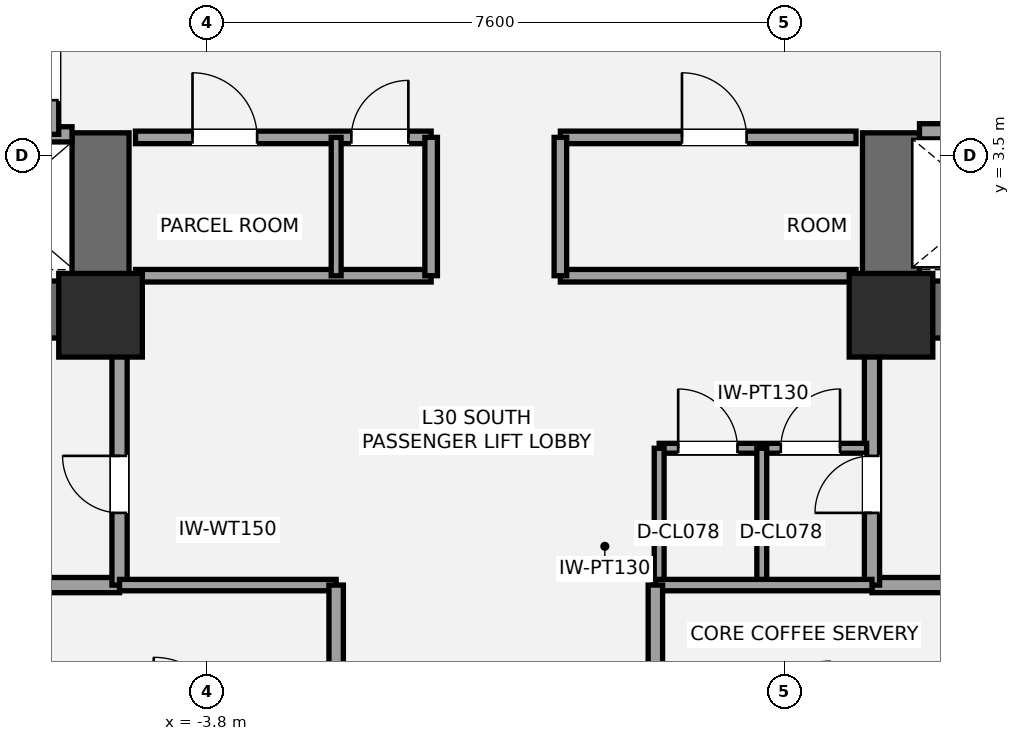
"""IFC4 building model, lengths in metres.
Left out: names, types, materials, properties, quantities, classifications, styles, units other than length and angle.
Written with IfcOpenShell. Run it as: python <this file> out.ifc"""

import sys

from ifc_helpers import new_model, si_unit, direction, frame, frame_2d, origin, origin_2d, place, context, subcontext, project, spatial, rectangle, extrude, element, fill, save


model = new_model("IFC4")
c1 = context("Model", 3, precision=1e-05, world=origin(), true_north=direction((0.0, 1.0)))
c2 = subcontext(c1, "Body", "Model", "MODEL_VIEW")
j1 = project(units=[si_unit("LENGTHUNIT", "METRE"), si_unit("PLANEANGLEUNIT", "RADIAN")], contexts=[c1])
p1 = place(None, origin())
s1 = spatial("IfcSite", under=j1, at=p1, CompositionType="ELEMENT")
p2 = place(p1, origin())
s2 = spatial("IfcBuilding", under=s1, at=p2, CompositionType="ELEMENT")
p3 = place(p2, frame((0.0, 0.0, 114.1)))
s3 = spatial("IfcBuildingStorey", under=s2, at=p3, CompositionType="ELEMENT", Elevation=114.1)
p4 = place(p3, frame((-4.825, 1.475, 0.0), z_axis=(0.0, 0.0, 1.0), x_axis=(-1.0, 0.0, 0.0)))
e1 = element("IfcWall", 1, at=p4, inside=s3, PredefinedType="SHEAR", context=c2, shape_type="SweptSolid", body=[
    extrude(rectangle(XDim=9.075, YDim=0.75, at=frame_2d((4.538, 0.0))), origin(), (0.0, 0.0, 1.0), 3.5),
])
p5 = place(p4, frame((5.475, 0.0, 0.0)))
e2 = element("IfcOpeningElement", 2, at=p5, cuts=e1, PredefinedType="OPENING", context=c2, shape_type="SweptSolid", body=[
    extrude(rectangle(XDim=1.05, YDim=2.15, at=frame_2d((0.525, 1.075))), frame((0.0, 0.385, 0.0), z_axis=(0.0, -1.0, 0.0), x_axis=(1.0, 0.0, 0.0)), (0.0, 0.0, 1.0), 0.77),
])
p6 = place(p4, frame((3.805, 0.0, 0.0)))
e3 = element("IfcOpeningElement", 3, at=p6, cuts=e1, PredefinedType="OPENING", context=c2, shape_type="SweptSolid", body=[
    extrude(rectangle(XDim=1.1, YDim=2.2, at=frame_2d((0.55, 1.1))), frame((0.0, 0.385, 0.0), z_axis=(0.0, -1.0, 0.0), x_axis=(1.0, 0.0, 0.0)), (0.0, 0.0, 1.0), 0.77),
])
p7 = place(p3, frame((-5.2, 1.1, 0.0), z_axis=(0.0, 0.0, 1.0), x_axis=(0.0, 1.0, 0.0)))
e4 = element("IfcWall", 4, at=p7, inside=s3, PredefinedType="SHEAR", context=c2, shape_type="SweptSolid", body=[
    extrude(rectangle(XDim=2.7, YDim=0.75, at=frame_2d((1.35, 0.0))), origin(), (0.0, 0.0, 1.0), 3.5),
])
p8 = place(p3, frame((13.9, 1.475, 0.0), z_axis=(0.0, 0.0, 1.0), x_axis=(-1.0, 0.0, 0.0)))
e5 = element("IfcWall", 5, at=p8, inside=s3, PredefinedType="SHEAR", context=c2, shape_type="SweptSolid", body=[
    extrude(rectangle(XDim=9.075, YDim=0.75, at=frame_2d((4.538, 0.0))), origin(), (0.0, 0.0, 1.0), 3.5),
])
p9 = place(p8, frame((2.55, 0.0, 0.0)))
e6 = element("IfcOpeningElement", 6, at=p9, cuts=e5, PredefinedType="OPENING", context=c2, shape_type="SweptSolid", body=[
    extrude(rectangle(XDim=1.05, YDim=2.15, at=frame_2d((0.525, 1.075))), frame((0.0, 0.385, 0.0), z_axis=(0.0, -1.0, 0.0), x_axis=(1.0, 0.0, 0.0)), (0.0, 0.0, 1.0), 0.77),
])
p10 = place(p8, frame((4.55, 0.0, 0.0)))
e7 = element("IfcOpeningElement", 7, at=p10, cuts=e5, PredefinedType="OPENING", context=c2, shape_type="SweptSolid", body=[
    extrude(rectangle(XDim=1.1, YDim=2.2, at=frame_2d((0.55, 1.1))), frame((0.0, 0.385, 0.0), z_axis=(0.0, -1.0, 0.0), x_axis=(1.0, 0.0, 0.0)), (0.0, 0.0, 1.0), 0.77),
])
p11 = place(p3, frame((5.2, 1.1, 0.0), z_axis=(0.0, 0.0, 1.0), x_axis=(0.0, 1.0, 0.0)))
e8 = element("IfcWall", 8, at=p11, inside=s3, PredefinedType="SHEAR", context=c2, shape_type="SweptSolid", body=[
    extrude(rectangle(XDim=2.7, YDim=0.75, at=frame_2d((1.35, 0.0))), origin(), (0.0, 0.0, 1.0), 3.5),
])
for number, where, z_axis, x_axis in (
    (9, (-5.2, 1.4, 0.0), (0.0, 0.0, 1.0), (1.0, 0.0, 0.0)),
    (10, (5.2, 1.4, 0.0), (0.0, 0.0, 1.0), (1.0, 0.0, 0.0)),
):
    element("IfcColumn", number, at=place(p3, frame(where, z_axis=z_axis, x_axis=x_axis)), inside=s3, PredefinedType="COLUMN", context=c2, shape_type="SweptSolid", body=[
        extrude(rectangle(XDim=1.1, YDim=1.1, at=origin_2d()), origin(), (0.0, 0.0, 1.0), 3.5),
    ])
p12 = place(p3, frame((-7.2, -2.15, 0.0), z_axis=(0.0, 0.0, 1.0), x_axis=(1.0, 0.0, 0.0)))
e11 = element("IfcWall", 11, at=p12, inside=s3, PredefinedType="SOLIDWALL", context=c2, shape_type="SweptSolid", body=[
    extrude(rectangle(XDim=2.25, YDim=0.2, at=frame_2d((1.125, 0.0))), origin(), (0.0, 0.0, 1.0), 3.31),
])
p13 = place(p3, frame((-4.95, -2.15, 0.0), z_axis=(0.0, 0.0, 1.0), x_axis=(0.0, 1.0, 0.0)))
e12 = element("IfcWall", 12, at=p13, inside=s3, PredefinedType="SOLIDWALL", context=c2, shape_type="SweptSolid", body=[
    extrude(rectangle(XDim=3.3, YDim=0.2, at=frame_2d((1.65, 0.0))), origin(), (0.0, 0.0, 1.0), 2.763),
])
p14 = place(p13, frame((0.95, 0.0, 0.0)))
e13 = element("IfcOpeningElement", 13, at=p14, cuts=e12, PredefinedType="OPENING", context=c2, shape_type="SweptSolid", body=[
    extrude(rectangle(XDim=0.75, YDim=2.1, at=frame_2d((0.375, 1.05))), frame((0.0, 0.11, 0.0), z_axis=(0.0, -1.0, 0.0), x_axis=(1.0, 0.0, 0.0)), (0.0, 0.0, 1.0), 0.22),
])
p15 = place(p3, frame((4.95, -2.15, 0.0), z_axis=(0.0, 0.0, 1.0), x_axis=(1.0, 0.0, 0.0)))
e14 = element("IfcWall", 14, at=p15, inside=s3, PredefinedType="SOLIDWALL", context=c2, shape_type="SweptSolid", body=[
    extrude(rectangle(XDim=2.25, YDim=0.2, at=frame_2d((1.125, 0.0))), origin(), (0.0, 0.0, 1.0), 3.31),
])
p16 = place(p3, frame((4.95, -2.15, 0.0), z_axis=(0.0, 0.0, 1.0), x_axis=(0.0, 1.0, 0.0)))
e15 = element("IfcWall", 15, at=p16, inside=s3, PredefinedType="SOLIDWALL", context=c2, shape_type="SweptSolid", body=[
    extrude(rectangle(XDim=3.3, YDim=0.2, at=frame_2d((1.65, 0.0))), origin(), (0.0, 0.0, 1.0), 2.763),
])
p17 = place(p16, frame((0.95, 0.0, 0.0)))
e16 = element("IfcOpeningElement", 16, at=p17, cuts=e15, PredefinedType="OPENING", context=c2, shape_type="SweptSolid", body=[
    extrude(rectangle(XDim=0.75, YDim=2.1, at=frame_2d((0.375, 1.05))), frame((0.0, 0.11, 0.0), z_axis=(0.0, -1.0, 0.0), x_axis=(1.0, 0.0, 0.0)), (0.0, 0.0, 1.0), 0.22),
])
p18 = place(p3, frame((2.15, -0.35, 0.0), z_axis=(0.0, 0.0, 1.0), x_axis=(1.0, 0.0, 0.0)))
e17 = element("IfcWall", 17, at=p18, inside=s3, PredefinedType="PARTITIONING", context=c2, shape_type="SweptSolid", body=[
    extrude(rectangle(XDim=2.73, YDim=0.13, at=frame_2d((1.365, 0.0))), origin(), (0.0, 0.0, 1.0), 3.31),
])
p19 = place(p18, frame((0.25, 0.0, 0.0)))
e18 = element("IfcOpeningElement", 18, at=p19, cuts=e17, PredefinedType="OPENING", context=c2, shape_type="SweptSolid", body=[
    extrude(rectangle(XDim=0.78, YDim=2.1, at=frame_2d((0.39, 1.05))), frame((0.0, 0.075, 0.0), z_axis=(0.0, -1.0, 0.0), x_axis=(1.0, 0.0, 0.0)), (0.0, 0.0, 1.0), 0.15),
])
p20 = place(p18, frame((1.6, 0.0, 0.0)))
e19 = element("IfcOpeningElement", 19, at=p20, cuts=e17, PredefinedType="OPENING", context=c2, shape_type="SweptSolid", body=[
    extrude(rectangle(XDim=0.78, YDim=2.1, at=frame_2d((0.39, 1.05))), frame((0.0, 0.075, 0.0), z_axis=(0.0, -1.0, 0.0), x_axis=(1.0, 0.0, 0.0)), (0.0, 0.0, 1.0), 0.15),
])
for number, where, z_axis, x_axis in (
    (20, (2.15, -2.15, 0.0), (0.0, 0.0, 1.0), (0.0, 1.0, 0.0)),
    (21, (3.5, -2.15, 0.0), (0.0, 0.0, 1.0), (0.0, 1.0, 0.0)),
):
    element("IfcWall", number, at=place(p3, frame(where, z_axis=z_axis, x_axis=x_axis)), inside=s3, PredefinedType="PARTITIONING", context=c2, shape_type="SweptSolid", body=[
        extrude(rectangle(XDim=1.8, YDim=0.13, at=frame_2d((0.9, 0.0))), origin(), (0.0, 0.0, 1.0), 3.31),
    ])
p21 = place(p3, frame((-9.78, 3.78, 0.0), z_axis=(0.0, 0.0, 1.0), x_axis=(1.0, 0.0, 0.0)))
e22 = element("IfcWall", 22, at=p21, inside=s3, PredefinedType="SOLIDWALL", context=c2, shape_type="SweptSolid", body=[
    extrude(rectangle(XDim=4.205, YDim=0.2, at=frame_2d((2.103, 0.0))), origin(), (0.0, 0.0, 1.0), 3.31),
])
p22 = place(p3, frame((-5.85, 3.78, 0.0), z_axis=(0.0, 0.0, 1.0), x_axis=(0.0, 1.0, 0.0)))
e23 = element("IfcWall", 23, at=p22, inside=s3, PredefinedType="SOLIDWALL", context=c2, shape_type="SweptSolid", body=[
    extrude(rectangle(XDim=1.69, YDim=0.2, at=frame_2d((0.845, 0.0))), origin(), (0.0, 0.0, 1.0), 3.31),
])
p23 = place(p22, frame((0.45, 0.0, 0.0)))
e24 = element("IfcOpeningElement", 24, at=p23, cuts=e23, PredefinedType="OPENING", context=c2, shape_type="SweptSolid", body=[
    extrude(rectangle(XDim=0.75, YDim=2.1, at=frame_2d((0.375, 1.05))), frame((0.0, 0.11, 0.0), z_axis=(0.0, -1.0, 0.0), x_axis=(1.0, 0.0, 0.0)), (0.0, 0.0, 1.0), 0.22),
])
p24 = place(p3, frame((5.575, 3.82, 0.0), z_axis=(0.0, 0.0, 1.0), x_axis=(1.0, 0.0, 0.0)))
e25 = element("IfcWall", 25, at=p24, inside=s3, PredefinedType="SOLIDWALL", context=c2, shape_type="SweptSolid", body=[
    extrude(rectangle(XDim=4.205, YDim=0.2, at=frame_2d((2.103, 0.0))), origin(), (0.0, 0.0, 1.0), 3.31),
])
p25 = place(p24, frame((0.65, 0.0, 0.0)))
e26 = element("IfcOpeningElement", 26, at=p25, cuts=e25, PredefinedType="OPENING", context=c2, shape_type="SweptSolid", body=[
    extrude(rectangle(XDim=1.2, YDim=2.2, at=frame_2d((0.6, 1.1))), frame((0.0, 0.11, 0.0), z_axis=(0.0, -1.0, 0.0), x_axis=(1.0, 0.0, 0.0)), (0.0, 0.0, 1.0), 0.22),
])
p26 = place(p3, frame((-4.74, 1.92, 0.0), z_axis=(0.0, 0.0, 1.0), x_axis=(1.0, 0.0, 0.0)))
e27 = element("IfcWall", 27, at=p26, inside=s3, PredefinedType="PARTITIONING", context=c2, shape_type="SweptSolid", body=[
    extrude(rectangle(XDim=3.89, YDim=0.165, at=frame_2d((1.945, 0.0))), origin(), (0.0, 0.0, 1.0), 2.3),
])
p27 = place(p3, frame((-4.74, 3.74, 0.0), z_axis=(0.0, 0.0, 1.0), x_axis=(1.0, 0.0, 0.0)))
e28 = element("IfcWall", 28, at=p27, inside=s3, PredefinedType="PARTITIONING", context=c2, shape_type="SweptSolid", body=[
    extrude(rectangle(XDim=3.89, YDim=0.165, at=frame_2d((1.945, 0.0))), origin(), (0.0, 0.0, 1.0), 3.31),
])
p28 = place(p27, frame((0.75, 0.0, 0.0)))
e29 = element("IfcOpeningElement", 29, at=p28, cuts=e28, PredefinedType="OPENING", context=c2, shape_type="SweptSolid", body=[
    extrude(rectangle(XDim=0.85, YDim=2.1, at=frame_2d((0.425, 1.05))), frame((0.0, 0.093, 0.0), z_axis=(0.0, -1.0, 0.0), x_axis=(1.0, 0.0, 0.0)), (0.0, 0.0, 1.0), 0.185),
])
p29 = place(p27, frame((2.84, 0.0, 0.0)))
e30 = element("IfcOpeningElement", 30, at=p29, cuts=e28, PredefinedType="OPENING", context=c2, shape_type="SweptSolid", body=[
    extrude(rectangle(XDim=0.75, YDim=2.1, at=frame_2d((0.375, 1.05))), frame((0.0, 0.093, 0.0), z_axis=(0.0, -1.0, 0.0), x_axis=(1.0, 0.0, 0.0)), (0.0, 0.0, 1.0), 0.185),
])
p30 = place(p3, frame((-0.85, 1.92, 0.0), z_axis=(0.0, 0.0, 1.0), x_axis=(0.0, 1.0, 0.0)))
e31 = element("IfcWall", 31, at=p30, inside=s3, PredefinedType="PARTITIONING", context=c2, shape_type="SweptSolid", body=[
    extrude(rectangle(XDim=1.82, YDim=0.165, at=frame_2d((0.91, 0.0))), origin(), (0.0, 0.0, 1.0), 3.31),
])
p31 = place(p3, frame((0.85, 1.92, 0.0), z_axis=(0.0, 0.0, 1.0), x_axis=(1.0, 0.0, 0.0)))
e32 = element("IfcWall", 32, at=p31, inside=s3, PredefinedType="PARTITIONING", context=c2, shape_type="SweptSolid", body=[
    extrude(rectangle(XDim=3.89, YDim=0.165, at=frame_2d((1.945, 0.0))), origin(), (0.0, 0.0, 1.0), 2.3),
])
p32 = place(p3, frame((0.85, 3.74, 0.0), z_axis=(0.0, 0.0, 1.0), x_axis=(1.0, 0.0, 0.0)))
e33 = element("IfcWall", 33, at=p32, inside=s3, PredefinedType="PARTITIONING", context=c2, shape_type="SweptSolid", body=[
    extrude(rectangle(XDim=3.89, YDim=0.165, at=frame_2d((1.945, 0.0))), origin(), (0.0, 0.0, 1.0), 3.31),
])
p33 = place(p32, frame((1.6, 0.0, 0.0)))
e34 = element("IfcOpeningElement", 34, at=p33, cuts=e33, PredefinedType="OPENING", context=c2, shape_type="SweptSolid", body=[
    extrude(rectangle(XDim=0.85, YDim=2.1, at=frame_2d((0.425, 1.05))), frame((0.0, 0.093, 0.0), z_axis=(0.0, -1.0, 0.0), x_axis=(1.0, 0.0, 0.0)), (0.0, 0.0, 1.0), 0.185),
])
p34 = place(p3, frame((0.85, 1.92, 0.0), z_axis=(0.0, 0.0, 1.0), x_axis=(0.0, 1.0, 0.0)))
e35 = element("IfcWall", 35, at=p34, inside=s3, PredefinedType="PARTITIONING", context=c2, shape_type="SweptSolid", body=[
    extrude(rectangle(XDim=1.82, YDim=0.165, at=frame_2d((0.91, 0.0))), origin(), (0.0, 0.0, 1.0), 3.31),
])
p35 = place(p3, frame((-2.1, 1.92, 0.0), z_axis=(0.0, 0.0, 1.0), x_axis=(0.0, 1.0, 0.0)))
e36 = element("IfcWall", 36, at=p35, inside=s3, PredefinedType="PARTITIONING", context=c2, shape_type="SweptSolid", body=[
    extrude(rectangle(XDim=1.82, YDim=0.13, at=frame_2d((0.91, 0.0))), origin(), (0.0, 0.0, 1.0), 3.31),
])
p36 = place(p3, frame((-4.95, -2.15, 0.0), z_axis=(0.0, 0.0, 1.0), x_axis=(1.0, 0.0, 0.0)))
e37 = element("IfcWall", 37, at=p36, inside=s3, PredefinedType="PLUMBINGWALL", context=c2, shape_type="SweptSolid", body=[
    extrude(rectangle(XDim=2.85, YDim=0.15, at=frame_2d((1.425, 0.0))), origin(), (0.0, 0.0, 1.0), 2.763),
])
p37 = place(p3, frame((-2.1, -4.05, 0.0), z_axis=(0.0, 0.0, 1.0), x_axis=(0.0, 1.0, 0.0)))
e38 = element("IfcWall", 38, at=p37, inside=s3, PredefinedType="PLUMBINGWALL", context=c2, shape_type="SweptSolid", body=[
    extrude(rectangle(XDim=1.9, YDim=0.19, at=frame_2d((0.95, 0.0))), origin(), (0.0, 0.0, 1.0), 3.31),
])
p38 = place(p3, frame((2.1, -2.15, 0.0), z_axis=(0.0, 0.0, 1.0), x_axis=(1.0, 0.0, 0.0)))
e39 = element("IfcWall", 39, at=p38, inside=s3, PredefinedType="PLUMBINGWALL", context=c2, shape_type="SweptSolid", body=[
    extrude(rectangle(XDim=2.85, YDim=0.15, at=frame_2d((1.425, 0.0))), origin(), (0.0, 0.0, 1.0), 3.31),
])
p39 = place(p3, frame((2.1, -4.05, 0.0), z_axis=(0.0, 0.0, 1.0), x_axis=(0.0, 1.0, 0.0)))
e40 = element("IfcWall", 40, at=p39, inside=s3, PredefinedType="PLUMBINGWALL", context=c2, shape_type="SweptSolid", body=[
    extrude(rectangle(XDim=1.9, YDim=0.19, at=frame_2d((0.95, 0.0))), origin(), (0.0, 0.0, 1.0), 3.31),
])
p40 = place(p14, origin())
e41 = element("IfcDoor", 41, at=p40, inside=s3, OperationType="SINGLE_SWING_RIGHT", PredefinedType="DOOR", context=c2, shape_type="SweptSolid", body=[
    extrude(rectangle(XDim=0.75, YDim=2.1, at=frame_2d((0.375, 1.05))), frame((0.0, 0.025, 0.0), z_axis=(0.0, -1.0, 0.0), x_axis=(1.0, 0.0, 0.0)), (0.0, 0.0, 1.0), 0.05),
])
fill(e13, e41)
p41 = place(p17, origin())
e42 = element("IfcDoor", 42, at=p41, inside=s3, OperationType="SINGLE_SWING_LEFT", PredefinedType="DOOR", context=c2, shape_type="SweptSolid", body=[
    extrude(rectangle(XDim=0.75, YDim=2.1, at=frame_2d((0.375, 1.05))), frame((0.0, 0.025, 0.0), z_axis=(0.0, -1.0, 0.0), x_axis=(1.0, 0.0, 0.0)), (0.0, 0.0, 1.0), 0.05),
])
fill(e16, e42)
p42 = place(p19, origin())
e43 = element("IfcDoor", 43, at=p42, inside=s3, OperationType="SINGLE_SWING_LEFT", PredefinedType="DOOR", context=c2, shape_type="SweptSolid", body=[
    extrude(rectangle(XDim=0.78, YDim=2.1, at=frame_2d((0.39, 1.05))), frame((0.0, 0.025, 0.0), z_axis=(0.0, -1.0, 0.0), x_axis=(1.0, 0.0, 0.0)), (0.0, 0.0, 1.0), 0.05),
])
fill(e18, e43)
p43 = place(p20, origin())
e44 = element("IfcDoor", 44, at=p43, inside=s3, OperationType="SINGLE_SWING_RIGHT", PredefinedType="DOOR", context=c2, shape_type="SweptSolid", body=[
    extrude(rectangle(XDim=0.78, YDim=2.1, at=frame_2d((0.39, 1.05))), frame((0.0, 0.025, 0.0), z_axis=(0.0, -1.0, 0.0), x_axis=(1.0, 0.0, 0.0)), (0.0, 0.0, 1.0), 0.05),
])
fill(e19, e44)
p44 = place(p23, origin())
e45 = element("IfcDoor", 45, at=p44, inside=s3, OperationType="SINGLE_SWING_RIGHT", PredefinedType="DOOR", context=c2, shape_type="SweptSolid", body=[
    extrude(rectangle(XDim=0.75, YDim=2.1, at=frame_2d((0.375, 1.05))), frame((0.0, 0.025, 0.0), z_axis=(0.0, -1.0, 0.0), x_axis=(1.0, 0.0, 0.0)), (0.0, 0.0, 1.0), 0.05),
])
fill(e24, e45)
p45 = place(p28, origin())
e46 = element("IfcDoor", 46, at=p45, inside=s3, OperationType="SINGLE_SWING_LEFT", PredefinedType="DOOR", context=c2, shape_type="SweptSolid", body=[
    extrude(rectangle(XDim=0.85, YDim=2.1, at=frame_2d((0.425, 1.05))), frame((0.0, 0.025, 0.0), z_axis=(0.0, -1.0, 0.0), x_axis=(1.0, 0.0, 0.0)), (0.0, 0.0, 1.0), 0.05),
])
fill(e29, e46)
p46 = place(p29, origin())
e47 = element("IfcDoor", 47, at=p46, inside=s3, OperationType="SINGLE_SWING_RIGHT", PredefinedType="DOOR", context=c2, shape_type="SweptSolid", body=[
    extrude(rectangle(XDim=0.75, YDim=2.1, at=frame_2d((0.375, 1.05))), frame((0.0, 0.025, 0.0), z_axis=(0.0, -1.0, 0.0), x_axis=(1.0, 0.0, 0.0)), (0.0, 0.0, 1.0), 0.05),
])
fill(e30, e47)
p47 = place(p33, origin())
e48 = element("IfcDoor", 48, at=p47, inside=s3, OperationType="SINGLE_SWING_LEFT", PredefinedType="DOOR", context=c2, shape_type="SweptSolid", body=[
    extrude(rectangle(XDim=0.85, YDim=2.1, at=frame_2d((0.425, 1.05))), frame((0.0, 0.025, 0.0), z_axis=(0.0, -1.0, 0.0), x_axis=(1.0, 0.0, 0.0)), (0.0, 0.0, 1.0), 0.05),
])
fill(e34, e48)
save(model, sys.argv[1])
